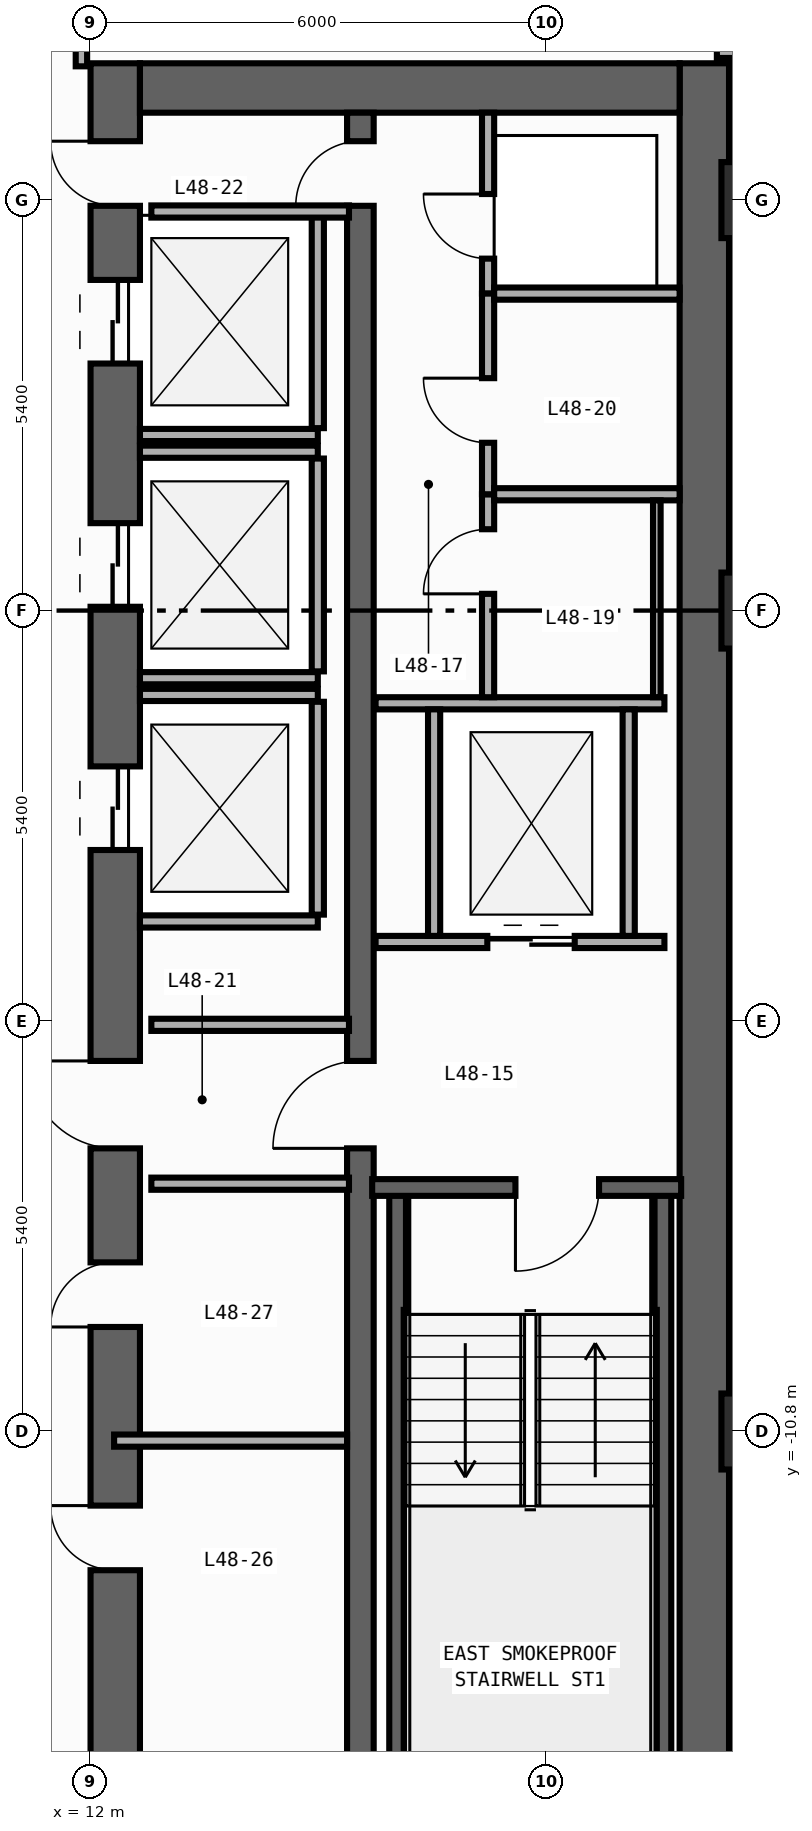
"""IFC4 building model, lengths in metres.
Left out: names, types, materials, properties, quantities, classifications, styles, units other than length and angle.
Written with IfcOpenShell. Run it as: python <this file> out.ifc"""

import sys

from ifc_helpers import new_model, si_unit, direction, frame, frame_2d, origin, origin_2d, place, context, subcontext, project, spatial, rectangle, extrude, element, fill, save


model = new_model("IFC4")
c1 = context("Model", 3, precision=1e-05, world=origin(), true_north=direction((0.0, 1.0)))
c2 = subcontext(c1, "Body", "Model", "MODEL_VIEW")
j1 = project(units=[si_unit("LENGTHUNIT", "METRE"), si_unit("PLANEANGLEUNIT", "RADIAN")], contexts=[c1])
p1 = place(None, origin())
s1 = spatial("IfcSite", under=j1, at=p1, CompositionType="ELEMENT")
p2 = place(p1, origin())
s2 = spatial("IfcBuilding", under=s1, at=p2, CompositionType="ELEMENT")
p3 = place(p2, frame((0.0, 0.0, 206.8)))
s3 = spatial("IfcBuildingStorey", under=s2, at=p3, CompositionType="ELEMENT", Elevation=206.8)
p4 = place(p3, frame((12.325, -19.8, 0.0), z_axis=(0.0, 0.0, 1.0), x_axis=(0.0, 1.0, 0.0)))
e1 = element("IfcWall", 1, at=p4, inside=s3, PredefinedType="SHEAR", context=c2, shape_type="SweptSolid", body=[
    extrude(rectangle(XDim=27.0, YDim=0.65, at=frame_2d((13.5, 0.0))), origin(), (0.0, 0.0, 1.0), 3.54),
])
p5 = place(p4, frame((23.05, 0.0, 0.0)))
e2 = element("IfcOpeningElement", 2, at=p5, cuts=e1, PredefinedType="OPENING", context=c2, shape_type="SweptSolid", body=[
    extrude(rectangle(XDim=1.1, YDim=2.2, at=frame_2d((0.55, 1.1))), frame((0.0, 0.335, 0.0), z_axis=(0.0, -1.0, 0.0), x_axis=(1.0, 0.0, 0.0)), (0.0, 0.0, 1.0), 0.67),
])
p6 = place(p4, frame((19.85, 0.0, 0.0)))
e3 = element("IfcOpeningElement", 3, at=p6, cuts=e1, PredefinedType="OPENING", context=c2, shape_type="SweptSolid", body=[
    extrude(rectangle(XDim=1.1, YDim=2.2, at=frame_2d((0.55, 1.1))), frame((0.0, 0.335, 0.0), z_axis=(0.0, -1.0, 0.0), x_axis=(1.0, 0.0, 0.0)), (0.0, 0.0, 1.0), 0.67),
])
p7 = place(p4, frame((16.65, 0.0, 0.0)))
e4 = element("IfcOpeningElement", 4, at=p7, cuts=e1, PredefinedType="OPENING", context=c2, shape_type="SweptSolid", body=[
    extrude(rectangle(XDim=1.1, YDim=2.2, at=frame_2d((0.55, 1.1))), frame((0.0, 0.335, 0.0), z_axis=(0.0, -1.0, 0.0), x_axis=(1.0, 0.0, 0.0)), (0.0, 0.0, 1.0), 0.67),
])
p8 = place(p4, frame((7.175, 0.0, 0.0)))
e5 = element("IfcOpeningElement", 5, at=p8, cuts=e1, PredefinedType="OPENING", context=c2, shape_type="SweptSolid", body=[
    extrude(rectangle(XDim=0.85, YDim=2.1, at=frame_2d((0.425, 1.05))), frame((0.0, 0.335, 0.0), z_axis=(0.0, -1.0, 0.0), x_axis=(1.0, 0.0, 0.0)), (0.0, 0.0, 1.0), 0.67),
])
p9 = place(p4, frame((10.375, 0.0, 0.0)))
e6 = element("IfcOpeningElement", 6, at=p9, cuts=e1, PredefinedType="OPENING", context=c2, shape_type="SweptSolid", body=[
    extrude(rectangle(XDim=0.85, YDim=2.1, at=frame_2d((0.425, 1.05))), frame((0.0, 0.335, 0.0), z_axis=(0.0, -1.0, 0.0), x_axis=(1.0, 0.0, 0.0)), (0.0, 0.0, 1.0), 0.67),
])
p10 = place(p4, frame((12.725, 0.0, 0.0)))
e7 = element("IfcOpeningElement", 7, at=p10, cuts=e1, PredefinedType="OPENING", context=c2, shape_type="SweptSolid", body=[
    extrude(rectangle(XDim=1.15, YDim=2.2, at=frame_2d((0.575, 1.1))), frame((0.0, 0.335, 0.0), z_axis=(0.0, -1.0, 0.0), x_axis=(1.0, 0.0, 0.0)), (0.0, 0.0, 1.0), 0.67),
])
p11 = place(p4, frame((25.125, 0.0, 0.0)))
e8 = element("IfcOpeningElement", 8, at=p11, cuts=e1, PredefinedType="OPENING", context=c2, shape_type="SweptSolid", body=[
    extrude(rectangle(XDim=0.85, YDim=2.1, at=frame_2d((0.425, 1.05))), frame((0.0, 0.335, 0.0), z_axis=(0.0, -1.0, 0.0), x_axis=(1.0, 0.0, 0.0)), (0.0, 0.0, 1.0), 0.67),
])
p12 = place(p3, frame((20.075, -19.8, 0.0), z_axis=(0.0, 0.0, 1.0), x_axis=(0.0, 1.0, 0.0)))
e9 = element("IfcWall", 9, at=p12, inside=s3, PredefinedType="SHEAR", context=c2, shape_type="SweptSolid", body=[
    extrude(rectangle(XDim=27.0, YDim=0.65, at=frame_2d((13.5, 0.0))), origin(), (0.0, 0.0, 1.0), 3.54),
])
p13 = place(p3, frame((12.65, 6.875, 0.0), z_axis=(0.0, 0.0, 1.0), x_axis=(1.0, 0.0, 0.0)))
e10 = element("IfcWall", 10, at=p13, inside=s3, PredefinedType="SHEAR", context=c2, shape_type="SweptSolid", body=[
    extrude(rectangle(XDim=7.1, YDim=0.65, at=frame_2d((3.55, 0.0))), origin(), (0.0, 0.0, 1.0), 3.54),
])
p14 = place(p3, frame((15.55, -19.15, 0.0), z_axis=(0.0, 0.0, 1.0), x_axis=(0.0, 1.0, 0.0)))
e11 = element("IfcWall", 11, at=p14, inside=s3, PredefinedType="SHEAR", context=c2, shape_type="SweptSolid", body=[
    extrude(rectangle(XDim=25.7, YDim=0.35, at=frame_2d((12.85, 0.0))), origin(), (0.0, 0.0, 1.0), 3.54),
])
p15 = place(p14, frame((12.075, 0.0, 0.0)))
e12 = element("IfcOpeningElement", 12, at=p15, cuts=e11, PredefinedType="OPENING", context=c2, shape_type="SweptSolid", body=[
    extrude(rectangle(XDim=1.15, YDim=2.2, at=frame_2d((0.575, 1.1))), frame((0.0, 0.185, 0.0), z_axis=(0.0, -1.0, 0.0), x_axis=(1.0, 0.0, 0.0)), (0.0, 0.0, 1.0), 0.37),
])
p16 = place(p14, frame((24.475, 0.0, 0.0)))
e13 = element("IfcOpeningElement", 13, at=p16, cuts=e11, PredefinedType="OPENING", context=c2, shape_type="SweptSolid", body=[
    extrude(rectangle(XDim=0.85, YDim=2.1, at=frame_2d((0.425, 1.05))), frame((0.0, 0.185, 0.0), z_axis=(0.0, -1.0, 0.0), x_axis=(1.0, 0.0, 0.0)), (0.0, 0.0, 1.0), 0.37),
])
for number, where, z_axis, x_axis in (
    (14, (16.04, -19.01, 0.0), (0.0, 0.0, 1.0), (0.0, 1.0, 0.0)),
    (15, (19.53, -19.01, 0.0), (0.0, 0.0, 1.0), (0.0, 1.0, 0.0)),
):
    element("IfcWall", number, at=place(p3, frame(where, z_axis=z_axis, x_axis=x_axis)), inside=s3, PredefinedType="SHEAR", context=c2, shape_type="SweptSolid", body=[
        extrude(rectangle(XDim=11.42, YDim=0.22, at=frame_2d((5.71, 0.0))), origin(), (0.0, 0.0, 1.0), 3.54),
    ])
p17 = place(p3, frame((19.77, -7.59, 0.0), z_axis=(0.0, 0.0, 1.0), x_axis=(-1.0, 0.0, 0.0)))
e16 = element("IfcWall", 16, at=p17, inside=s3, PredefinedType="SHEAR", context=c2, shape_type="SweptSolid", body=[
    extrude(rectangle(XDim=4.065, YDim=0.22, at=frame_2d((2.032, 0.0))), origin(), (0.0, 0.0, 1.0), 3.54),
])
p18 = place(p17, frame((1.08, 0.0, 0.0)))
e17 = element("IfcOpeningElement", 17, at=p18, cuts=e16, PredefinedType="OPENING", context=c2, shape_type="SweptSolid", body=[
    extrude(rectangle(XDim=1.1, YDim=2.2, at=frame_2d((0.55, 1.1))), frame((0.0, 0.12, 0.0), z_axis=(0.0, -1.0, 0.0), x_axis=(1.0, 0.0, 0.0)), (0.0, 0.0, 1.0), 0.24),
])
for number, where, z_axis, x_axis in (
    (18, (20.8, -10.8, 0.0), (0.0, 0.0, 1.0), (1.0, 0.0, 0.0)),
    (19, (20.8, 0.0, 0.0), (0.0, 0.0, 1.0), (1.0, 0.0, 0.0)),
    (20, (20.8, 5.4, 0.0), (0.0, 0.0, 1.0), (1.0, 0.0, 0.0)),
):
    element("IfcColumn", number, at=place(p3, frame(where, z_axis=z_axis, x_axis=x_axis)), inside=s3, PredefinedType="COLUMN", context=c2, shape_type="SweptSolid", body=[
        extrude(rectangle(XDim=1.0, YDim=1.0, at=origin_2d()), origin(), (0.0, 0.0, 1.0), 3.8),
    ])
p19 = place(p3, frame((12.65, 2.31, 0.0), z_axis=(0.0, 0.0, 1.0), x_axis=(1.0, 0.0, 0.0)))
e21 = element("IfcWall", 21, at=p19, inside=s3, PredefinedType="STANDARD", context=c2, shape_type="SweptSolid", body=[
    extrude(rectangle(XDim=2.34, YDim=0.16, at=frame_2d((1.17, 0.0))), origin(), (0.0, 0.0, 1.0), 3.54),
])
p20 = place(p3, frame((14.99, 2.4, 0.0), z_axis=(0.0, 0.0, 1.0), x_axis=(0.0, 1.0, 0.0)))
e22 = element("IfcWall", 22, at=p20, inside=s3, PredefinedType="STANDARD", context=c2, shape_type="SweptSolid", body=[
    extrude(rectangle(XDim=2.8, YDim=0.16, at=frame_2d((1.4, 0.0))), origin(), (0.0, 0.0, 1.0), 3.54),
])
for number, where, z_axis, x_axis in (
    (23, (12.65, -0.89, 0.0), (0.0, 0.0, 1.0), (1.0, 0.0, 0.0)),
    (24, (12.65, 2.09, 0.0), (0.0, 0.0, 1.0), (1.0, 0.0, 0.0)),
):
    element("IfcWall", number, at=place(p3, frame(where, z_axis=z_axis, x_axis=x_axis)), inside=s3, PredefinedType="STANDARD", context=c2, shape_type="SweptSolid", body=[
        extrude(rectangle(XDim=2.34, YDim=0.16, at=frame_2d((1.17, 0.0))), origin(), (0.0, 0.0, 1.0), 3.54),
    ])
p21 = place(p3, frame((14.99, -0.8, 0.0), z_axis=(0.0, 0.0, 1.0), x_axis=(0.0, 1.0, 0.0)))
e25 = element("IfcWall", 25, at=p21, inside=s3, PredefinedType="STANDARD", context=c2, shape_type="SweptSolid", body=[
    extrude(rectangle(XDim=2.8, YDim=0.16, at=frame_2d((1.4, 0.0))), origin(), (0.0, 0.0, 1.0), 3.54),
])
for number, where, z_axis, x_axis in (
    (26, (12.65, -4.09, 0.0), (0.0, 0.0, 1.0), (1.0, 0.0, 0.0)),
    (27, (12.65, -1.11, 0.0), (0.0, 0.0, 1.0), (1.0, 0.0, 0.0)),
):
    element("IfcWall", number, at=place(p3, frame(where, z_axis=z_axis, x_axis=x_axis)), inside=s3, PredefinedType="STANDARD", context=c2, shape_type="SweptSolid", body=[
        extrude(rectangle(XDim=2.34, YDim=0.16, at=frame_2d((1.17, 0.0))), origin(), (0.0, 0.0, 1.0), 3.54),
    ])
p22 = place(p3, frame((14.99, -4.0, 0.0), z_axis=(0.0, 0.0, 1.0), x_axis=(0.0, 1.0, 0.0)))
e28 = element("IfcWall", 28, at=p22, inside=s3, PredefinedType="STANDARD", context=c2, shape_type="SweptSolid", body=[
    extrude(rectangle(XDim=2.8, YDim=0.16, at=frame_2d((1.4, 0.0))), origin(), (0.0, 0.0, 1.0), 3.54),
])
p23 = place(p3, frame((15.75, -4.36, 0.0), z_axis=(0.0, 0.0, 1.0), x_axis=(1.0, 0.0, 0.0)))
e29 = element("IfcWall", 29, at=p23, inside=s3, PredefinedType="STANDARD", context=c2, shape_type="SweptSolid", body=[
    extrude(rectangle(XDim=3.8, YDim=0.16, at=frame_2d((1.9, 0.0))), origin(), (0.0, 0.0, 1.0), 3.54),
])
p24 = place(p23, frame((1.47, 0.0, 0.0)))
e30 = element("IfcOpeningElement", 30, at=p24, cuts=e29, PredefinedType="OPENING", context=c2, shape_type="SweptSolid", body=[
    extrude(rectangle(XDim=1.15, YDim=2.2, at=frame_2d((0.575, 1.1))), frame((0.0, 0.09, 0.0), z_axis=(0.0, -1.0, 0.0), x_axis=(1.0, 0.0, 0.0)), (0.0, 0.0, 1.0), 0.18),
])
p25 = place(p3, frame((15.75, -1.22, 0.0), z_axis=(0.0, 0.0, 1.0), x_axis=(1.0, 0.0, 0.0)))
e31 = element("IfcWall", 31, at=p25, inside=s3, PredefinedType="STANDARD", context=c2, shape_type="SweptSolid", body=[
    extrude(rectangle(XDim=3.8, YDim=0.16, at=frame_2d((1.9, 0.0))), origin(), (0.0, 0.0, 1.0), 3.54),
])
for number, where, z_axis, x_axis in (
    (32, (16.52, -4.28, 0.0), (0.0, 0.0, 1.0), (0.0, 1.0, 0.0)),
    (33, (19.08, -4.28, 0.0), (0.0, 0.0, 1.0), (0.0, 1.0, 0.0)),
):
    element("IfcWall", number, at=place(p3, frame(where, z_axis=z_axis, x_axis=x_axis)), inside=s3, PredefinedType="STANDARD", context=c2, shape_type="SweptSolid", body=[
        extrude(rectangle(XDim=2.98, YDim=0.16, at=frame_2d((1.49, 0.0))), origin(), (0.0, 0.0, 1.0), 3.54),
    ])
for number, where, z_axis, x_axis in (
    (34, (12.8, -5.45, 0.0), (0.0, 0.0, 1.0), (1.0, 0.0, 0.0)),
    (35, (12.8, -7.54, 0.0), (0.0, 0.0, 1.0), (1.0, 0.0, 0.0)),
    (36, (12.8, 5.25, 0.0), (0.0, 0.0, 1.0), (1.0, 0.0, 0.0)),
):
    element("IfcWall", number, at=place(p3, frame(where, z_axis=z_axis, x_axis=x_axis)), inside=s3, PredefinedType="STANDARD", context=c2, shape_type="SweptSolid", body=[
        extrude(rectangle(XDim=2.6, YDim=0.16, at=frame_2d((1.3, 0.0))), origin(), (0.0, 0.0, 1.0), 3.54),
    ])
p26 = place(p3, frame((17.23, 4.17, 0.0), z_axis=(0.0, 0.0, 1.0), x_axis=(0.0, 1.0, 0.0)))
e37 = element("IfcWall", 37, at=p26, inside=s3, PredefinedType="PARTITIONING", context=c2, shape_type="SweptSolid", body=[
    extrude(rectangle(XDim=2.38, YDim=0.16, at=frame_2d((1.19, 0.0))), origin(), (0.0, 0.0, 1.0), 3.54),
])
p27 = place(p26, frame((0.46, 0.0, 0.0)))
e38 = element("IfcOpeningElement", 38, at=p27, cuts=e37, PredefinedType="OPENING", context=c2, shape_type="SweptSolid", body=[
    extrude(rectangle(XDim=0.85, YDim=2.1, at=frame_2d((0.425, 1.05))), frame((0.0, 0.09, 0.0), z_axis=(0.0, -1.0, 0.0), x_axis=(1.0, 0.0, 0.0)), (0.0, 0.0, 1.0), 0.18),
])
p28 = place(p3, frame((17.23, -1.14, 0.0), z_axis=(0.0, 0.0, 1.0), x_axis=(0.0, 1.0, 0.0)))
e39 = element("IfcWall", 39, at=p28, inside=s3, PredefinedType="PARTITIONING", context=c2, shape_type="SweptSolid", body=[
    extrude(rectangle(XDim=2.67, YDim=0.16, at=frame_2d((1.335, 0.0))), origin(), (0.0, 0.0, 1.0), 3.54),
])
p29 = place(p28, frame((1.36, 0.0, 0.0)))
e40 = element("IfcOpeningElement", 40, at=p29, cuts=e39, PredefinedType="OPENING", context=c2, shape_type="SweptSolid", body=[
    extrude(rectangle(XDim=0.85, YDim=2.1, at=frame_2d((0.425, 1.05))), frame((0.0, 0.09, 0.0), z_axis=(0.0, -1.0, 0.0), x_axis=(1.0, 0.0, 0.0)), (0.0, 0.0, 1.0), 0.18),
])
p30 = place(p3, frame((17.23, 1.53, 0.0), z_axis=(0.0, 0.0, 1.0), x_axis=(0.0, 1.0, 0.0)))
e41 = element("IfcWall", 41, at=p30, inside=s3, PredefinedType="PARTITIONING", context=c2, shape_type="SweptSolid", body=[
    extrude(rectangle(XDim=2.64, YDim=0.16, at=frame_2d((1.32, 0.0))), origin(), (0.0, 0.0, 1.0), 3.54),
])
p31 = place(p30, frame((0.677, 0.0, 0.0)))
e42 = element("IfcOpeningElement", 42, at=p31, cuts=e41, PredefinedType="OPENING", context=c2, shape_type="SweptSolid", body=[
    extrude(rectangle(XDim=0.85, YDim=2.1, at=frame_2d((0.425, 1.05))), frame((0.0, 0.09, 0.0), z_axis=(0.0, -1.0, 0.0), x_axis=(1.0, 0.0, 0.0)), (0.0, 0.0, 1.0), 0.18),
])
for number, where, z_axis, x_axis in (
    (43, (17.31, 4.17, 0.0), (0.0, 0.0, 1.0), (1.0, 0.0, 0.0)),
    (44, (17.31, 1.53, 0.0), (0.0, 0.0, 1.0), (1.0, 0.0, 0.0)),
):
    element("IfcWall", number, at=place(p3, frame(where, z_axis=z_axis, x_axis=x_axis)), inside=s3, PredefinedType="PARTITIONING", context=c2, shape_type="SweptSolid", body=[
        extrude(rectangle(XDim=2.44, YDim=0.16, at=frame_2d((1.22, 0.0))), origin(), (0.0, 0.0, 1.0), 3.54),
    ])
p32 = place(p3, frame((12.31, -10.92, 0.0), z_axis=(0.0, 0.0, 1.0), x_axis=(1.0, 0.0, 0.0)))
e45 = element("IfcWall", 45, at=p32, inside=s3, PredefinedType="PARTITIONING", context=c2, shape_type="SweptSolid", body=[
    extrude(rectangle(XDim=3.065, YDim=0.16, at=frame_2d((1.532, 0.0))), origin(), (0.0, 0.0, 1.0), 2.952),
])
p33 = place(p3, frame((11.88, 7.16, 0.0), z_axis=(0.0, 0.0, 1.0), x_axis=(0.0, 1.0, 0.0)))
e46 = element("IfcWall", 46, at=p33, inside=s3, PredefinedType="PARTITIONING", context=c2, shape_type="SweptSolid", body=[
    extrude(rectangle(XDim=9.255, YDim=0.15, at=frame_2d((4.627, 0.0))), origin(), (0.0, 0.0, 1.0), 3.54),
])
p34 = place(p33, frame((0.46, 0.0, 0.0)))
e47 = element("IfcOpeningElement", 47, at=p34, cuts=e46, PredefinedType="OPENING", context=c2, shape_type="SweptSolid", body=[
    extrude(rectangle(XDim=0.9, YDim=2.15, at=frame_2d((0.45, 1.075))), frame((0.0, 0.085, 0.0), z_axis=(0.0, -1.0, 0.0), x_axis=(1.0, 0.0, 0.0)), (0.0, 0.0, 1.0), 0.17),
])
p35 = place(p3, frame((20.24, 7.34, 0.0), z_axis=(0.0, 0.0, 1.0), x_axis=(1.0, 0.0, 0.0)))
e48 = element("IfcWall", 48, at=p35, inside=s3, PredefinedType="PARTITIONING", context=c2, shape_type="SweptSolid", body=[
    extrude(rectangle(XDim=2.215, YDim=0.14, at=frame_2d((1.107, 0.0))), origin(), (0.0, 0.0, 1.0), 3.54),
])
p36 = place(p35, frame((0.905, 0.0, 0.0)))
e49 = element("IfcOpeningElement", 49, at=p36, cuts=e48, PredefinedType="OPENING", context=c2, shape_type="SweptSolid", body=[
    extrude(rectangle(XDim=0.85, YDim=2.1, at=frame_2d((0.425, 1.05))), frame((0.0, 0.08, 0.0), z_axis=(0.0, -1.0, 0.0), x_axis=(1.0, 0.0, 0.0)), (0.0, 0.0, 1.0), 0.16),
])
p37 = place(p3, frame((19.45, 1.45, 0.0), z_axis=(0.0, 0.0, 1.0), x_axis=(0.0, -1.0, 0.0)))
e50 = element("IfcWall", 50, at=p37, inside=s3, PredefinedType="PARTITIONING", context=c2, shape_type="SweptSolid", body=[
    extrude(rectangle(XDim=2.59, YDim=0.1, at=frame_2d((1.295, 0.0))), origin(), (0.0, 0.0, 1.0), 3.54),
])
p38 = place(p18, origin())
e51 = element("IfcDoor", 51, at=p38, inside=s3, OperationType="SINGLE_SWING_RIGHT", PredefinedType="DOOR", context=c2, shape_type="SweptSolid", body=[
    extrude(rectangle(XDim=1.1, YDim=2.2, at=frame_2d((0.55, 1.1))), frame((0.0, 0.025, 0.0), z_axis=(0.0, -1.0, 0.0), x_axis=(1.0, 0.0, 0.0)), (0.0, 0.0, 1.0), 0.05),
])
fill(e17, e51)
p39 = place(p5, origin())
e52 = element("IfcDoor", 52, at=p39, inside=s3, OperationType="DOUBLE_DOOR_SLIDING", PredefinedType="DOOR", context=c2, shape_type="SweptSolid", body=[
    extrude(rectangle(XDim=1.1, YDim=2.2, at=frame_2d((0.55, 1.1))), frame((0.0, 0.025, 0.0), z_axis=(0.0, -1.0, 0.0), x_axis=(1.0, 0.0, 0.0)), (0.0, 0.0, 1.0), 0.05),
])
fill(e2, e52)
p40 = place(p6, origin())
e53 = element("IfcDoor", 53, at=p40, inside=s3, OperationType="DOUBLE_DOOR_SLIDING", PredefinedType="DOOR", context=c2, shape_type="SweptSolid", body=[
    extrude(rectangle(XDim=1.1, YDim=2.2, at=frame_2d((0.55, 1.1))), frame((0.0, 0.025, 0.0), z_axis=(0.0, -1.0, 0.0), x_axis=(1.0, 0.0, 0.0)), (0.0, 0.0, 1.0), 0.05),
])
fill(e3, e53)
p41 = place(p7, origin())
e54 = element("IfcDoor", 54, at=p41, inside=s3, OperationType="DOUBLE_DOOR_SLIDING", PredefinedType="DOOR", context=c2, shape_type="SweptSolid", body=[
    extrude(rectangle(XDim=1.1, YDim=2.2, at=frame_2d((0.55, 1.1))), frame((0.0, 0.025, 0.0), z_axis=(0.0, -1.0, 0.0), x_axis=(1.0, 0.0, 0.0)), (0.0, 0.0, 1.0), 0.05),
])
fill(e4, e54)
p42 = place(p8, origin())
e55 = element("IfcDoor", 55, at=p42, inside=s3, OperationType="SINGLE_SWING_RIGHT", PredefinedType="DOOR", context=c2, shape_type="SweptSolid", body=[
    extrude(rectangle(XDim=0.85, YDim=2.1, at=frame_2d((0.425, 1.05))), frame((0.0, 0.025, 0.0), z_axis=(0.0, -1.0, 0.0), x_axis=(1.0, 0.0, 0.0)), (0.0, 0.0, 1.0), 0.05),
])
fill(e5, e55)
p43 = place(p9, origin())
e56 = element("IfcDoor", 56, at=p43, inside=s3, OperationType="SINGLE_SWING_LEFT", PredefinedType="DOOR", context=c2, shape_type="SweptSolid", body=[
    extrude(rectangle(XDim=0.85, YDim=2.1, at=frame_2d((0.425, 1.05))), frame((0.0, 0.025, 0.0), z_axis=(0.0, -1.0, 0.0), x_axis=(1.0, 0.0, 0.0)), (0.0, 0.0, 1.0), 0.05),
])
fill(e6, e56)
p44 = place(p10, origin())
e57 = element("IfcDoor", 57, at=p44, inside=s3, OperationType="SINGLE_SWING_RIGHT", PredefinedType="DOOR", context=c2, shape_type="SweptSolid", body=[
    extrude(rectangle(XDim=1.15, YDim=2.2, at=frame_2d((0.575, 1.1))), frame((0.0, 0.025, 0.0), z_axis=(0.0, -1.0, 0.0), x_axis=(1.0, 0.0, 0.0)), (0.0, 0.0, 1.0), 0.05),
])
fill(e7, e57)
p45 = place(p15, origin())
e58 = element("IfcDoor", 58, at=p45, inside=s3, OperationType="SINGLE_SWING_LEFT", PredefinedType="DOOR", context=c2, shape_type="SweptSolid", body=[
    extrude(rectangle(XDim=1.15, YDim=2.2, at=frame_2d((0.575, 1.1))), frame((0.0, 0.025, 0.0), z_axis=(0.0, -1.0, 0.0), x_axis=(1.0, 0.0, 0.0)), (0.0, 0.0, 1.0), 0.05),
])
fill(e12, e58)
p46 = place(p11, origin())
e59 = element("IfcDoor", 59, at=p46, inside=s3, OperationType="SINGLE_SWING_RIGHT", PredefinedType="DOOR", context=c2, shape_type="SweptSolid", body=[
    extrude(rectangle(XDim=0.85, YDim=2.1, at=frame_2d((0.425, 1.05))), frame((0.0, 0.025, 0.0), z_axis=(0.0, -1.0, 0.0), x_axis=(1.0, 0.0, 0.0)), (0.0, 0.0, 1.0), 0.05),
])
fill(e8, e59)
p47 = place(p16, origin())
e60 = element("IfcDoor", 60, at=p47, inside=s3, OperationType="SINGLE_SWING_LEFT", PredefinedType="DOOR", context=c2, shape_type="SweptSolid", body=[
    extrude(rectangle(XDim=0.85, YDim=2.1, at=frame_2d((0.425, 1.05))), frame((0.0, 0.025, 0.0), z_axis=(0.0, -1.0, 0.0), x_axis=(1.0, 0.0, 0.0)), (0.0, 0.0, 1.0), 0.05),
])
fill(e13, e60)
p48 = place(p24, origin())
e61 = element("IfcDoor", 61, at=p48, inside=s3, OperationType="DOUBLE_DOOR_SLIDING", PredefinedType="DOOR", context=c2, shape_type="SweptSolid", body=[
    extrude(rectangle(XDim=1.15, YDim=2.2, at=frame_2d((0.575, 1.1))), frame((0.0, 0.025, 0.0), z_axis=(0.0, -1.0, 0.0), x_axis=(1.0, 0.0, 0.0)), (0.0, 0.0, 1.0), 0.05),
])
fill(e30, e61)
p49 = place(p27, origin())
e62 = element("IfcDoor", 62, at=p49, inside=s3, OperationType="SINGLE_SWING_RIGHT", PredefinedType="DOOR", context=c2, shape_type="SweptSolid", body=[
    extrude(rectangle(XDim=0.85, YDim=2.1, at=frame_2d((0.425, 1.05))), frame((0.0, 0.025, 0.0), z_axis=(0.0, -1.0, 0.0), x_axis=(1.0, 0.0, 0.0)), (0.0, 0.0, 1.0), 0.05),
])
fill(e38, e62)
p50 = place(p29, origin())
e63 = element("IfcDoor", 63, at=p50, inside=s3, OperationType="SINGLE_SWING_LEFT", PredefinedType="DOOR", context=c2, shape_type="SweptSolid", body=[
    extrude(rectangle(XDim=0.85, YDim=2.1, at=frame_2d((0.425, 1.05))), frame((0.0, 0.025, 0.0), z_axis=(0.0, -1.0, 0.0), x_axis=(1.0, 0.0, 0.0)), (0.0, 0.0, 1.0), 0.05),
])
fill(e40, e63)
p51 = place(p31, origin())
e64 = element("IfcDoor", 64, at=p51, inside=s3, OperationType="SINGLE_SWING_RIGHT", PredefinedType="DOOR", context=c2, shape_type="SweptSolid", body=[
    extrude(rectangle(XDim=0.85, YDim=2.1, at=frame_2d((0.425, 1.05))), frame((0.0, 0.025, 0.0), z_axis=(0.0, -1.0, 0.0), x_axis=(1.0, 0.0, 0.0)), (0.0, 0.0, 1.0), 0.05),
])
fill(e42, e64)
save(model, sys.argv[1])
